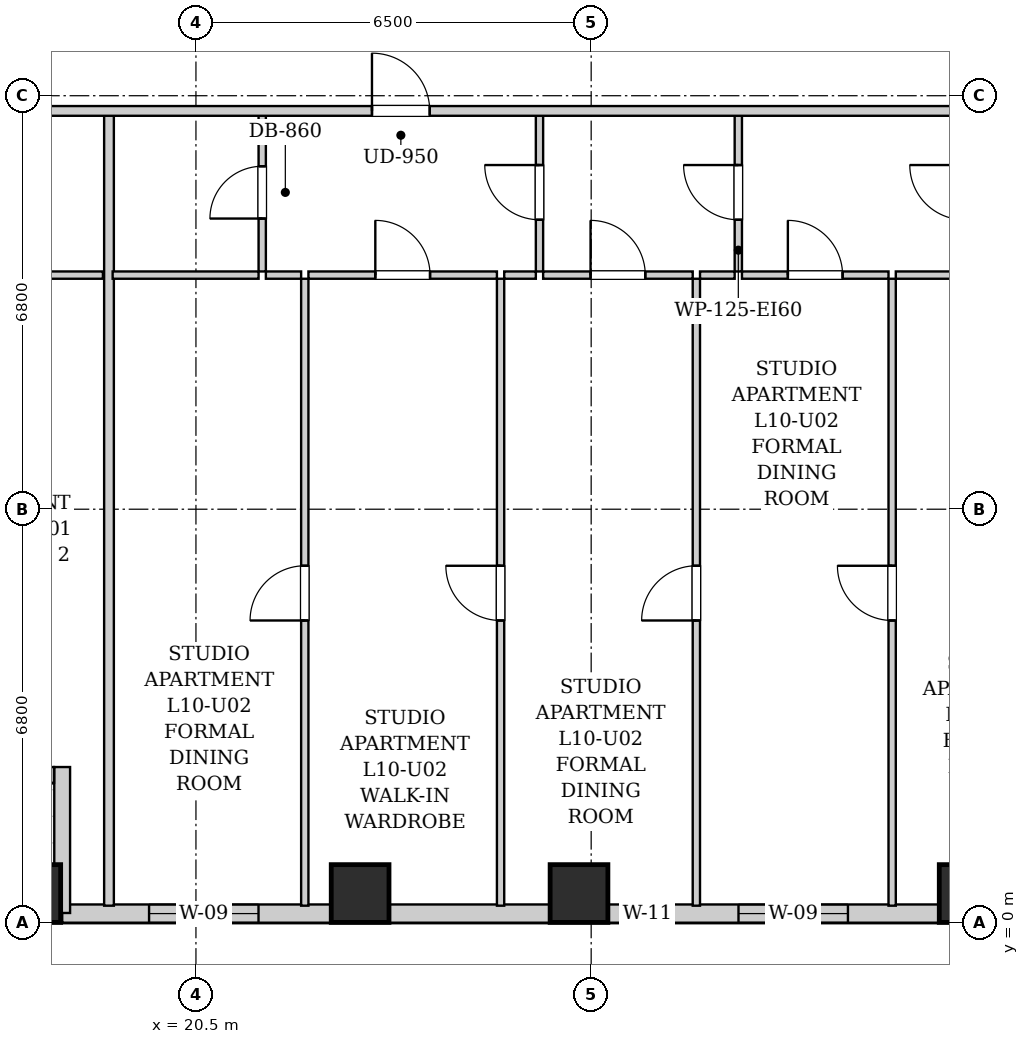
"""IFC4 building model, lengths in metres.
Left out: names, types, materials, properties, quantities, classifications, styles, units other than length and angle.
Written with IfcOpenShell. Run it as: python <this file> out.ifc"""

import sys

from ifc_helpers import new_model, si_unit, direction, frame, frame_2d, origin, origin_2d, place, context, subcontext, project, spatial, rectangle, extrude, element, fill, save


model = new_model("IFC4")
c1 = context("Model", 3, precision=1e-05, world=origin(), true_north=direction((0.0, 1.0)))
c2 = subcontext(c1, "Body", "Model", "MODEL_VIEW")
j1 = project(units=[si_unit("LENGTHUNIT", "METRE"), si_unit("PLANEANGLEUNIT", "RADIAN")], contexts=[c1])
p1 = place(None, origin())
s1 = spatial("IfcSite", under=j1, at=p1, CompositionType="ELEMENT")
p2 = place(p1, origin())
s2 = spatial("IfcBuilding", under=s1, at=p2, CompositionType="ELEMENT")
p3 = place(p2, frame((0.0, 0.0, 41.8)))
s3 = spatial("IfcBuildingStorey", under=s2, at=p3, CompositionType="ELEMENT", Elevation=41.8)
for number, where, z_axis, x_axis in (
    (1, (17.8, 0.48, 0.0), (0.0, 0.0, 1.0), (1.0, 0.0, 0.0)),
    (2, (23.2, 0.48, 0.0), (0.0, 0.0, 1.0), (1.0, 0.0, 0.0)),
    (3, (26.8, 0.48, 0.0), (0.0, 0.0, 1.0), (1.0, 0.0, 0.0)),
    (4, (33.2, 0.48, 0.0), (0.0, 0.0, 1.0), (1.0, 0.0, 0.0)),
):
    element("IfcColumn", number, at=place(p3, frame(where, z_axis=z_axis, x_axis=x_axis)), inside=s3, PredefinedType="COLUMN", context=c2, shape_type="SweptSolid", body=[
        extrude(rectangle(XDim=0.95, YDim=0.95, at=origin_2d()), origin(), (0.0, 0.0, 1.0), 3.2),
    ])
p4 = place(p3, frame((44.0, 0.15, 0.0), z_axis=(0.0, 0.0, 1.0), x_axis=(-1.0, 0.0, 0.0)))
e5 = element("IfcWall", 5, at=p4, inside=s3, PredefinedType="SOLIDWALL", context=c2, shape_type="SweptSolid", body=[
    extrude(rectangle(XDim=25.7, YDim=0.3, at=frame_2d((12.85, 0.0))), origin(), (0.0, 0.0, 1.0), 1.975),
])
p5 = place(p4, frame((22.471, 0.0, 0.55)))
e6 = element("IfcOpeningElement", 6, at=p5, cuts=e5, PredefinedType="OPENING", context=c2, shape_type="SweptSolid", body=[
    extrude(rectangle(XDim=1.8, YDim=1.2, at=frame_2d((0.9, 0.6))), frame((0.0, 0.16, 0.0), z_axis=(0.0, -1.0, 0.0), x_axis=(1.0, 0.0, 0.0)), (0.0, 0.0, 1.0), 0.32),
])
p6 = place(p4, frame((15.65, 0.0, 0.55)))
e7 = element("IfcOpeningElement", 7, at=p6, cuts=e5, PredefinedType="OPENING", context=c2, shape_type="SweptSolid", body=[
    extrude(rectangle(XDim=0.85, YDim=1.2, at=frame_2d((0.425, 0.6))), frame((0.0, 0.16, 0.0), z_axis=(0.0, -1.0, 0.0), x_axis=(1.0, 0.0, 0.0)), (0.0, 0.0, 1.0), 0.32),
])
p7 = place(p4, frame((12.777, 0.0, 0.55)))
e8 = element("IfcOpeningElement", 8, at=p7, cuts=e5, PredefinedType="OPENING", context=c2, shape_type="SweptSolid", body=[
    extrude(rectangle(XDim=1.8, YDim=1.2, at=frame_2d((0.9, 0.6))), frame((0.0, 0.16, 0.0), z_axis=(0.0, -1.0, 0.0), x_axis=(1.0, 0.0, 0.0)), (0.0, 0.0, 1.0), 0.32),
])
p8 = place(p4, frame((9.315, 0.0, 0.55)))
e9 = element("IfcOpeningElement", 9, at=p8, cuts=e5, PredefinedType="OPENING", context=c2, shape_type="SweptSolid", body=[
    extrude(rectangle(XDim=0.85, YDim=1.2, at=frame_2d((0.425, 0.6))), frame((0.0, 0.16, 0.0), z_axis=(0.0, -1.0, 0.0), x_axis=(1.0, 0.0, 0.0)), (0.0, 0.0, 1.0), 0.32),
])
p9 = place(p4, frame((6.435, 0.0, 0.55)))
e10 = element("IfcOpeningElement", 10, at=p9, cuts=e5, PredefinedType="OPENING", context=c2, shape_type="SweptSolid", body=[
    extrude(rectangle(XDim=1.8, YDim=1.2, at=frame_2d((0.9, 0.6))), frame((0.0, 0.16, 0.0), z_axis=(0.0, -1.0, 0.0), x_axis=(1.0, 0.0, 0.0)), (0.0, 0.0, 1.0), 0.32),
])
p10 = place(p4, frame((2.106, 0.0, 0.55)))
e11 = element("IfcOpeningElement", 11, at=p10, cuts=e5, PredefinedType="OPENING", context=c2, shape_type="SweptSolid", body=[
    extrude(rectangle(XDim=1.8, YDim=1.2, at=frame_2d((0.9, 0.6))), frame((0.0, 0.16, 0.0), z_axis=(0.0, -1.0, 0.0), x_axis=(1.0, 0.0, 0.0)), (0.0, 0.0, 1.0), 0.32),
])
p11 = place(p3, frame((18.3, 0.16, 0.0), z_axis=(0.0, 0.0, 1.0), x_axis=(0.0, 1.0, 0.0)))
e12 = element("IfcWall", 12, at=p11, inside=s3, PredefinedType="SOLIDWALL", context=c2, shape_type="SweptSolid", body=[
    extrude(rectangle(XDim=2.4, YDim=0.26, at=frame_2d((1.2, 0.0))), origin(), (0.0, 0.0, 1.0), 2.94),
])
p12 = place(p3, frame((18.166, 2.43, 0.0), z_axis=(0.0, 0.0, 1.0), x_axis=(-1.0, 0.0, 0.0)))
e13 = element("IfcWall", 13, at=p12, inside=s3, PredefinedType="SOLIDWALL", context=c2, shape_type="SweptSolid", body=[
    extrude(rectangle(XDim=5.432, YDim=0.26, at=frame_2d((2.716, 0.0))), origin(), (0.0, 0.0, 1.0), 2.94),
])
p13 = place(p12, frame((2.591, 0.0, 0.0)))
e14 = element("IfcOpeningElement", 14, at=p13, cuts=e13, PredefinedType="OPENING", context=c2, shape_type="SweptSolid", body=[
    extrude(rectangle(XDim=1.1, YDim=2.0, at=frame_2d((0.55, 1.0))), frame((0.0, 0.14, 0.0), z_axis=(0.0, -1.0, 0.0), x_axis=(1.0, 0.0, 0.0)), (0.0, 0.0, 1.0), 0.28),
])
p14 = place(p12, frame((3.851, 0.0, 0.55)))
e15 = element("IfcOpeningElement", 15, at=p14, cuts=e13, PredefinedType="OPENING", context=c2, shape_type="SweptSolid", body=[
    extrude(rectangle(XDim=0.85, YDim=1.2, at=frame_2d((0.425, 0.6))), frame((0.0, 0.14, 0.0), z_axis=(0.0, -1.0, 0.0), x_axis=(1.0, 0.0, 0.0)), (0.0, 0.0, 1.0), 0.28),
])
p15 = place(p12, frame((0.683, 0.0, 0.85)))
e16 = element("IfcOpeningElement", 16, at=p15, cuts=e13, PredefinedType="OPENING", context=c2, shape_type="SweptSolid", body=[
    extrude(rectangle(XDim=1.35, YDim=1.65, at=frame_2d((0.675, 0.825))), frame((0.0, 0.14, 0.0), z_axis=(0.0, -1.0, 0.0), x_axis=(1.0, 0.0, 0.0)), (0.0, 0.0, 1.0), 0.28),
])
p16 = place(p3, frame((16.17, 10.65, 0.0), z_axis=(0.0, 0.0, 1.0), x_axis=(1.0, 0.0, 0.0)))
e17 = element("IfcWall", 17, at=p16, inside=s3, PredefinedType="PARTITIONING", context=c2, shape_type="SweptSolid", body=[
    extrude(rectangle(XDim=2.8, YDim=0.12, at=frame_2d((1.4, 0.0))), origin(), (0.0, 0.0, 1.0), 2.94),
])
p17 = place(p16, frame((0.95, 0.0, 0.0)))
e18 = element("IfcOpeningElement", 18, at=p17, cuts=e17, PredefinedType="OPENING", context=c2, shape_type="SweptSolid", body=[
    extrude(rectangle(XDim=0.9, YDim=2.05, at=frame_2d((0.45, 1.025))), frame((0.0, 0.07, 0.0), z_axis=(0.0, -1.0, 0.0), x_axis=(1.0, 0.0, 0.0)), (0.0, 0.0, 1.0), 0.14),
])
p18 = place(p3, frame((19.07, 0.28, 0.0), z_axis=(0.0, 0.0, 1.0), x_axis=(0.0, 1.0, 0.0)))
e19 = element("IfcWall", 19, at=p18, inside=s3, PredefinedType="PARTITIONING", context=c2, shape_type="SweptSolid", body=[
    extrude(rectangle(XDim=13.03, YDim=0.16, at=frame_2d((6.515, 0.0))), origin(), (0.0, 0.0, 1.0), 2.94),
])
p19 = place(p3, frame((21.59, 10.71, 0.0), z_axis=(0.0, 0.0, 1.0), x_axis=(0.0, 1.0, 0.0)))
e20 = element("IfcWall", 20, at=p19, inside=s3, PredefinedType="PARTITIONING", context=c2, shape_type="SweptSolid", body=[
    extrude(rectangle(XDim=2.6, YDim=0.12, at=frame_2d((1.3, 0.0))), origin(), (0.0, 0.0, 1.0), 2.94),
])
p20 = place(p19, frame((0.87, 0.0, 0.0)))
e21 = element("IfcOpeningElement", 21, at=p20, cuts=e20, PredefinedType="OPENING", context=c2, shape_type="SweptSolid", body=[
    extrude(rectangle(XDim=0.86, YDim=2.05, at=frame_2d((0.43, 1.025))), frame((0.0, 0.07, 0.0), z_axis=(0.0, -1.0, 0.0), x_axis=(1.0, 0.0, 0.0)), (0.0, 0.0, 1.0), 0.14),
])
p21 = place(p3, frame((19.13, 10.65, 0.0), z_axis=(0.0, 0.0, 1.0), x_axis=(1.0, 0.0, 0.0)))
e22 = element("IfcWall", 22, at=p21, inside=s3, PredefinedType="PARTITIONING", context=c2, shape_type="SweptSolid", body=[
    extrude(rectangle(XDim=2.4, YDim=0.12, at=frame_2d((1.2, 0.0))), origin(), (0.0, 0.0, 1.0), 2.94),
])
p22 = place(p3, frame((26.15, 10.71, 0.0), z_axis=(0.0, 0.0, 1.0), x_axis=(0.0, 1.0, 0.0)))
e23 = element("IfcWall", 23, at=p22, inside=s3, PredefinedType="PARTITIONING", context=c2, shape_type="SweptSolid", body=[
    extrude(rectangle(XDim=2.6, YDim=0.12, at=frame_2d((1.3, 0.0))), origin(), (0.0, 0.0, 1.0), 2.94),
])
p23 = place(p22, frame((0.85, 0.0, 0.0)))
e24 = element("IfcOpeningElement", 24, at=p23, cuts=e23, PredefinedType="OPENING", context=c2, shape_type="SweptSolid", body=[
    extrude(rectangle(XDim=0.9, YDim=2.05, at=frame_2d((0.45, 1.025))), frame((0.0, 0.07, 0.0), z_axis=(0.0, -1.0, 0.0), x_axis=(1.0, 0.0, 0.0)), (0.0, 0.0, 1.0), 0.14),
])
p24 = place(p3, frame((21.65, 10.65, 0.0), z_axis=(0.0, 0.0, 1.0), x_axis=(1.0, 0.0, 0.0)))
e25 = element("IfcWall", 25, at=p24, inside=s3, PredefinedType="PARTITIONING", context=c2, shape_type="SweptSolid", body=[
    extrude(rectangle(XDim=0.58, YDim=0.12, at=frame_2d((0.29, 0.0))), origin(), (0.0, 0.0, 1.0), 2.94),
])
p25 = place(p3, frame((22.35, 10.65, 0.0), z_axis=(0.0, 0.0, 1.0), x_axis=(1.0, 0.0, 0.0)))
e26 = element("IfcWall", 26, at=p25, inside=s3, PredefinedType="PARTITIONING", context=c2, shape_type="SweptSolid", body=[
    extrude(rectangle(XDim=3.1, YDim=0.12, at=frame_2d((1.55, 0.0))), origin(), (0.0, 0.0, 1.0), 2.94),
])
p26 = place(p25, frame((1.1, 0.0, 0.0)))
e27 = element("IfcOpeningElement", 27, at=p26, cuts=e26, PredefinedType="OPENING", context=c2, shape_type="SweptSolid", body=[
    extrude(rectangle(XDim=0.9, YDim=2.05, at=frame_2d((0.45, 1.025))), frame((0.0, 0.07, 0.0), z_axis=(0.0, -1.0, 0.0), x_axis=(1.0, 0.0, 0.0)), (0.0, 0.0, 1.0), 0.14),
])
p27 = place(p3, frame((25.57, 10.65, 0.0), z_axis=(0.0, 0.0, 1.0), x_axis=(1.0, 0.0, 0.0)))
e28 = element("IfcWall", 28, at=p27, inside=s3, PredefinedType="PARTITIONING", context=c2, shape_type="SweptSolid", body=[
    extrude(rectangle(XDim=0.52, YDim=0.12, at=frame_2d((0.26, 0.0))), origin(), (0.0, 0.0, 1.0), 2.94),
])
p28 = place(p3, frame((29.42, 10.71, 0.0), z_axis=(0.0, 0.0, 1.0), x_axis=(0.0, 1.0, 0.0)))
e29 = element("IfcWall", 29, at=p28, inside=s3, PredefinedType="PARTITIONING", context=c2, shape_type="SweptSolid", body=[
    extrude(rectangle(XDim=2.6, YDim=0.12, at=frame_2d((1.3, 0.0))), origin(), (0.0, 0.0, 1.0), 2.94),
])
p29 = place(p28, frame((0.85, 0.0, 0.0)))
e30 = element("IfcOpeningElement", 30, at=p29, cuts=e29, PredefinedType="OPENING", context=c2, shape_type="SweptSolid", body=[
    extrude(rectangle(XDim=0.9, YDim=2.05, at=frame_2d((0.45, 1.025))), frame((0.0, 0.07, 0.0), z_axis=(0.0, -1.0, 0.0), x_axis=(1.0, 0.0, 0.0)), (0.0, 0.0, 1.0), 0.14),
])
p30 = place(p3, frame((26.21, 10.65, 0.0), z_axis=(0.0, 0.0, 1.0), x_axis=(1.0, 0.0, 0.0)))
e31 = element("IfcWall", 31, at=p30, inside=s3, PredefinedType="PARTITIONING", context=c2, shape_type="SweptSolid", body=[
    extrude(rectangle(XDim=2.46, YDim=0.12, at=frame_2d((1.23, 0.0))), origin(), (0.0, 0.0, 1.0), 2.94),
])
p31 = place(p30, frame((0.78, 0.0, 0.0)))
e32 = element("IfcOpeningElement", 32, at=p31, cuts=e31, PredefinedType="OPENING", context=c2, shape_type="SweptSolid", body=[
    extrude(rectangle(XDim=0.9, YDim=2.05, at=frame_2d((0.45, 1.025))), frame((0.0, 0.07, 0.0), z_axis=(0.0, -1.0, 0.0), x_axis=(1.0, 0.0, 0.0)), (0.0, 0.0, 1.0), 0.14),
])
p32 = place(p3, frame((28.79, 10.65, 0.0), z_axis=(0.0, 0.0, 1.0), x_axis=(1.0, 0.0, 0.0)))
e33 = element("IfcWall", 33, at=p32, inside=s3, PredefinedType="PARTITIONING", context=c2, shape_type="SweptSolid", body=[
    extrude(rectangle(XDim=0.57, YDim=0.12, at=frame_2d((0.285, 0.0))), origin(), (0.0, 0.0, 1.0), 2.94),
])
p33 = place(p3, frame((29.48, 10.65, 0.0), z_axis=(0.0, 0.0, 1.0), x_axis=(1.0, 0.0, 0.0)))
e34 = element("IfcWall", 34, at=p33, inside=s3, PredefinedType="PARTITIONING", context=c2, shape_type="SweptSolid", body=[
    extrude(rectangle(XDim=2.41, YDim=0.12, at=frame_2d((1.205, 0.0))), origin(), (0.0, 0.0, 1.0), 2.94),
])
p34 = place(p33, frame((0.755, 0.0, 0.0)))
e35 = element("IfcOpeningElement", 35, at=p34, cuts=e34, PredefinedType="OPENING", context=c2, shape_type="SweptSolid", body=[
    extrude(rectangle(XDim=0.9, YDim=2.05, at=frame_2d((0.45, 1.025))), frame((0.0, 0.07, 0.0), z_axis=(0.0, -1.0, 0.0), x_axis=(1.0, 0.0, 0.0)), (0.0, 0.0, 1.0), 0.14),
])
p35 = place(p3, frame((32.01, 10.65, 0.0), z_axis=(0.0, 0.0, 1.0), x_axis=(1.0, 0.0, 0.0)))
e36 = element("IfcWall", 36, at=p35, inside=s3, PredefinedType="PARTITIONING", context=c2, shape_type="SweptSolid", body=[
    extrude(rectangle(XDim=1.07, YDim=0.12, at=frame_2d((0.535, 0.0))), origin(), (0.0, 0.0, 1.0), 2.94),
])
p36 = place(p3, frame((22.29, 0.28, 0.0), z_axis=(0.0, 0.0, 1.0), x_axis=(0.0, 1.0, 0.0)))
e37 = element("IfcWall", 37, at=p36, inside=s3, PredefinedType="PARTITIONING", context=c2, shape_type="SweptSolid", body=[
    extrude(rectangle(XDim=10.31, YDim=0.12, at=frame_2d((5.155, 0.0))), origin(), (0.0, 0.0, 1.0), 2.94),
])
p37 = place(p36, frame((4.69, 0.0, 0.0)))
e38 = element("IfcOpeningElement", 38, at=p37, cuts=e37, PredefinedType="OPENING", context=c2, shape_type="SweptSolid", body=[
    extrude(rectangle(XDim=0.9, YDim=2.05, at=frame_2d((0.45, 1.025))), frame((0.0, 0.07, 0.0), z_axis=(0.0, -1.0, 0.0), x_axis=(1.0, 0.0, 0.0)), (0.0, 0.0, 1.0), 0.14),
])
p38 = place(p3, frame((25.51, 0.28, 0.0), z_axis=(0.0, 0.0, 1.0), x_axis=(0.0, 1.0, 0.0)))
e39 = element("IfcWall", 39, at=p38, inside=s3, PredefinedType="PARTITIONING", context=c2, shape_type="SweptSolid", body=[
    extrude(rectangle(XDim=10.31, YDim=0.12, at=frame_2d((5.155, 0.0))), origin(), (0.0, 0.0, 1.0), 2.94),
])
p39 = place(p38, frame((4.69, 0.0, 0.0)))
e40 = element("IfcOpeningElement", 40, at=p39, cuts=e39, PredefinedType="OPENING", context=c2, shape_type="SweptSolid", body=[
    extrude(rectangle(XDim=0.9, YDim=2.05, at=frame_2d((0.45, 1.025))), frame((0.0, 0.07, 0.0), z_axis=(0.0, -1.0, 0.0), x_axis=(1.0, 0.0, 0.0)), (0.0, 0.0, 1.0), 0.14),
])
p40 = place(p3, frame((28.73, 0.28, 0.0), z_axis=(0.0, 0.0, 1.0), x_axis=(0.0, 1.0, 0.0)))
e41 = element("IfcWall", 41, at=p40, inside=s3, PredefinedType="PARTITIONING", context=c2, shape_type="SweptSolid", body=[
    extrude(rectangle(XDim=10.31, YDim=0.12, at=frame_2d((5.155, 0.0))), origin(), (0.0, 0.0, 1.0), 2.94),
])
p41 = place(p40, frame((4.69, 0.0, 0.0)))
e42 = element("IfcOpeningElement", 42, at=p41, cuts=e41, PredefinedType="OPENING", context=c2, shape_type="SweptSolid", body=[
    extrude(rectangle(XDim=0.9, YDim=2.05, at=frame_2d((0.45, 1.025))), frame((0.0, 0.07, 0.0), z_axis=(0.0, -1.0, 0.0), x_axis=(1.0, 0.0, 0.0)), (0.0, 0.0, 1.0), 0.14),
])
p42 = place(p3, frame((31.95, 0.28, 0.0), z_axis=(0.0, 0.0, 1.0), x_axis=(0.0, 1.0, 0.0)))
e43 = element("IfcWall", 43, at=p42, inside=s3, PredefinedType="PARTITIONING", context=c2, shape_type="SweptSolid", body=[
    extrude(rectangle(XDim=10.31, YDim=0.12, at=frame_2d((5.155, 0.0))), origin(), (0.0, 0.0, 1.0), 2.94),
])
p43 = place(p42, frame((4.69, 0.0, 0.0)))
e44 = element("IfcOpeningElement", 44, at=p43, cuts=e43, PredefinedType="OPENING", context=c2, shape_type="SweptSolid", body=[
    extrude(rectangle(XDim=0.9, YDim=2.05, at=frame_2d((0.45, 1.025))), frame((0.0, 0.07, 0.0), z_axis=(0.0, -1.0, 0.0), x_axis=(1.0, 0.0, 0.0)), (0.0, 0.0, 1.0), 0.14),
])
p44 = place(p3, frame((10.05, 13.35, 0.0), z_axis=(0.0, 0.0, 1.0), x_axis=(1.0, 0.0, 0.0)))
e45 = element("IfcWall", 45, at=p44, inside=s3, PredefinedType="PARTITIONING", context=c2, shape_type="SweptSolid", body=[
    extrude(rectangle(XDim=33.9, YDim=0.16, at=frame_2d((16.95, 0.0))), origin(), (0.0, 0.0, 1.0), 2.94),
])
p45 = place(p44, frame((3.8, 0.0, 0.0)))
e46 = element("IfcOpeningElement", 46, at=p45, cuts=e45, PredefinedType="OPENING", context=c2, shape_type="SweptSolid", body=[
    extrude(rectangle(XDim=0.95, YDim=2.1, at=frame_2d((0.475, 1.05))), frame((0.0, 0.09, 0.0), z_axis=(0.0, -1.0, 0.0), x_axis=(1.0, 0.0, 0.0)), (0.0, 0.0, 1.0), 0.18),
])
p46 = place(p44, frame((13.345, 0.0, 0.0)))
e47 = element("IfcOpeningElement", 47, at=p46, cuts=e45, PredefinedType="OPENING", context=c2, shape_type="SweptSolid", body=[
    extrude(rectangle(XDim=0.95, YDim=2.1, at=frame_2d((0.475, 1.05))), frame((0.0, 0.09, 0.0), z_axis=(0.0, -1.0, 0.0), x_axis=(1.0, 0.0, 0.0)), (0.0, 0.0, 1.0), 0.18),
])
p47 = place(p20, origin())
e48 = element("IfcDoor", 48, at=p47, inside=s3, OperationType="SINGLE_SWING_LEFT", PredefinedType="DOOR", context=c2, shape_type="SweptSolid", body=[
    extrude(rectangle(XDim=0.86, YDim=2.05, at=frame_2d((0.43, 1.025))), frame((0.0, 0.025, 0.0), z_axis=(0.0, -1.0, 0.0), x_axis=(1.0, 0.0, 0.0)), (0.0, 0.0, 1.0), 0.05),
])
fill(e21, e48)
p48 = place(p23, origin())
e49 = element("IfcDoor", 49, at=p48, inside=s3, OperationType="SINGLE_SWING_RIGHT", PredefinedType="DOOR", context=c2, shape_type="SweptSolid", body=[
    extrude(rectangle(XDim=0.9, YDim=2.05, at=frame_2d((0.45, 1.025))), frame((0.0, 0.025, 0.0), z_axis=(0.0, -1.0, 0.0), x_axis=(1.0, 0.0, 0.0)), (0.0, 0.0, 1.0), 0.05),
])
fill(e24, e49)
p49 = place(p26, origin())
e50 = element("IfcDoor", 50, at=p49, inside=s3, OperationType="SINGLE_SWING_LEFT", PredefinedType="DOOR", context=c2, shape_type="SweptSolid", body=[
    extrude(rectangle(XDim=0.9, YDim=2.05, at=frame_2d((0.45, 1.025))), frame((0.0, 0.025, 0.0), z_axis=(0.0, -1.0, 0.0), x_axis=(1.0, 0.0, 0.0)), (0.0, 0.0, 1.0), 0.05),
])
fill(e27, e50)
p50 = place(p29, origin())
e51 = element("IfcDoor", 51, at=p50, inside=s3, OperationType="SINGLE_SWING_RIGHT", PredefinedType="DOOR", context=c2, shape_type="SweptSolid", body=[
    extrude(rectangle(XDim=0.9, YDim=2.05, at=frame_2d((0.45, 1.025))), frame((0.0, 0.025, 0.0), z_axis=(0.0, -1.0, 0.0), x_axis=(1.0, 0.0, 0.0)), (0.0, 0.0, 1.0), 0.05),
])
fill(e30, e51)
p51 = place(p31, origin())
e52 = element("IfcDoor", 52, at=p51, inside=s3, OperationType="SINGLE_SWING_LEFT", PredefinedType="DOOR", context=c2, shape_type="SweptSolid", body=[
    extrude(rectangle(XDim=0.9, YDim=2.05, at=frame_2d((0.45, 1.025))), frame((0.0, 0.025, 0.0), z_axis=(0.0, -1.0, 0.0), x_axis=(1.0, 0.0, 0.0)), (0.0, 0.0, 1.0), 0.05),
])
fill(e32, e52)
p52 = place(p34, origin())
e53 = element("IfcDoor", 53, at=p52, inside=s3, OperationType="SINGLE_SWING_LEFT", PredefinedType="DOOR", context=c2, shape_type="SweptSolid", body=[
    extrude(rectangle(XDim=0.9, YDim=2.05, at=frame_2d((0.45, 1.025))), frame((0.0, 0.025, 0.0), z_axis=(0.0, -1.0, 0.0), x_axis=(1.0, 0.0, 0.0)), (0.0, 0.0, 1.0), 0.05),
])
fill(e35, e53)
p53 = place(p37, origin())
e54 = element("IfcDoor", 54, at=p53, inside=s3, OperationType="SINGLE_SWING_LEFT", PredefinedType="DOOR", context=c2, shape_type="SweptSolid", body=[
    extrude(rectangle(XDim=0.9, YDim=2.05, at=frame_2d((0.45, 1.025))), frame((0.0, 0.025, 0.0), z_axis=(0.0, -1.0, 0.0), x_axis=(1.0, 0.0, 0.0)), (0.0, 0.0, 1.0), 0.05),
])
fill(e38, e54)
p54 = place(p39, origin())
e55 = element("IfcDoor", 55, at=p54, inside=s3, OperationType="SINGLE_SWING_RIGHT", PredefinedType="DOOR", context=c2, shape_type="SweptSolid", body=[
    extrude(rectangle(XDim=0.9, YDim=2.05, at=frame_2d((0.45, 1.025))), frame((0.0, 0.025, 0.0), z_axis=(0.0, -1.0, 0.0), x_axis=(1.0, 0.0, 0.0)), (0.0, 0.0, 1.0), 0.05),
])
fill(e40, e55)
p55 = place(p41, origin())
e56 = element("IfcDoor", 56, at=p55, inside=s3, OperationType="SINGLE_SWING_LEFT", PredefinedType="DOOR", context=c2, shape_type="SweptSolid", body=[
    extrude(rectangle(XDim=0.9, YDim=2.05, at=frame_2d((0.45, 1.025))), frame((0.0, 0.025, 0.0), z_axis=(0.0, -1.0, 0.0), x_axis=(1.0, 0.0, 0.0)), (0.0, 0.0, 1.0), 0.05),
])
fill(e42, e56)
p56 = place(p43, origin())
e57 = element("IfcDoor", 57, at=p56, inside=s3, OperationType="SINGLE_SWING_RIGHT", PredefinedType="DOOR", context=c2, shape_type="SweptSolid", body=[
    extrude(rectangle(XDim=0.9, YDim=2.05, at=frame_2d((0.45, 1.025))), frame((0.0, 0.025, 0.0), z_axis=(0.0, -1.0, 0.0), x_axis=(1.0, 0.0, 0.0)), (0.0, 0.0, 1.0), 0.05),
])
fill(e44, e57)
p57 = place(p46, origin())
e58 = element("IfcDoor", 58, at=p57, inside=s3, OperationType="SINGLE_SWING_LEFT", PredefinedType="DOOR", context=c2, shape_type="SweptSolid", body=[
    extrude(rectangle(XDim=0.95, YDim=2.1, at=frame_2d((0.475, 1.05))), frame((0.0, 0.025, 0.0), z_axis=(0.0, -1.0, 0.0), x_axis=(1.0, 0.0, 0.0)), (0.0, 0.0, 1.0), 0.05),
])
fill(e47, e58)
p58 = place(p5, origin())
e59 = element("IfcWindow", 59, at=p58, inside=s3, PartitioningType="DOUBLE_PANEL_VERTICAL", PredefinedType="WINDOW", context=c2, shape_type="SweptSolid", body=[
    extrude(rectangle(XDim=1.8, YDim=1.2, at=frame_2d((0.9, 0.6))), frame((0.0, 0.03, 0.0), z_axis=(0.0, -1.0, 0.0), x_axis=(1.0, 0.0, 0.0)), (0.0, 0.0, 1.0), 0.06),
])
fill(e6, e59)
p59 = place(p6, origin())
e60 = element("IfcWindow", 60, at=p59, inside=s3, PartitioningType="SINGLE_PANEL", PredefinedType="WINDOW", context=c2, shape_type="SweptSolid", body=[
    extrude(rectangle(XDim=0.85, YDim=1.2, at=frame_2d((0.425, 0.6))), frame((0.0, 0.03, 0.0), z_axis=(0.0, -1.0, 0.0), x_axis=(1.0, 0.0, 0.0)), (0.0, 0.0, 1.0), 0.06),
])
fill(e7, e60)
p60 = place(p7, origin())
e61 = element("IfcWindow", 61, at=p60, inside=s3, PartitioningType="DOUBLE_PANEL_VERTICAL", PredefinedType="WINDOW", context=c2, shape_type="SweptSolid", body=[
    extrude(rectangle(XDim=1.8, YDim=1.2, at=frame_2d((0.9, 0.6))), frame((0.0, 0.03, 0.0), z_axis=(0.0, -1.0, 0.0), x_axis=(1.0, 0.0, 0.0)), (0.0, 0.0, 1.0), 0.06),
])
fill(e8, e61)
save(model, sys.argv[1])
